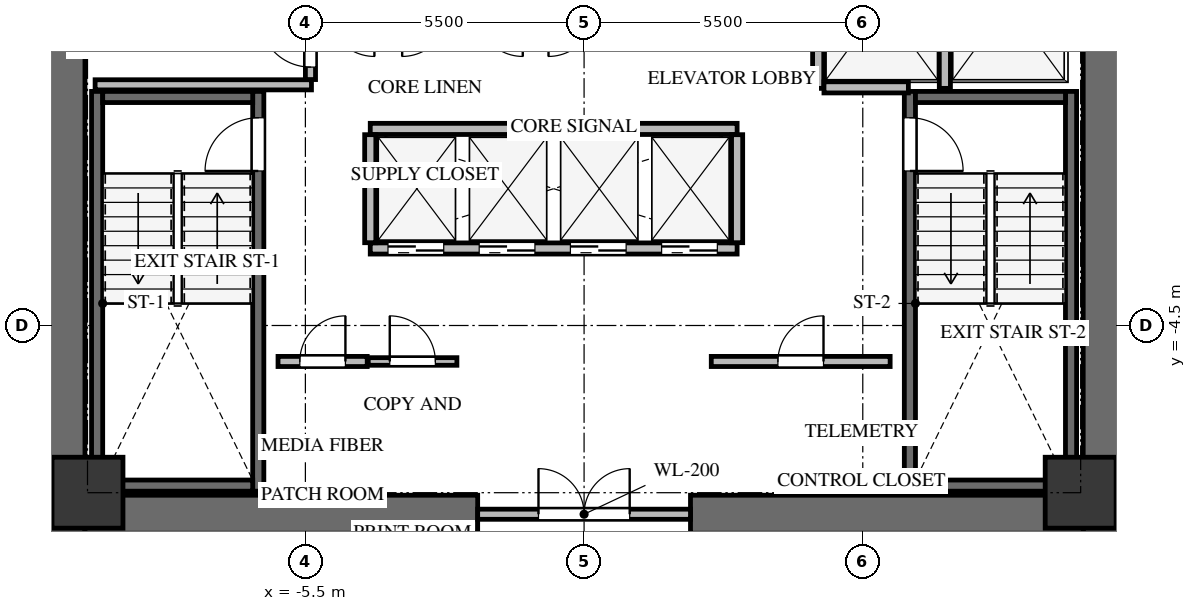
"""IFC4 building model, lengths in metres.
Left out: names, types, materials, properties, quantities, classifications, styles, units other than length and angle.
Written with IfcOpenShell. Run it as: python <this file> out.ifc"""

import sys

from ifc_helpers import new_model, si_unit, direction, frame, frame_2d, origin, origin_2d, place, context, subcontext, project, spatial, rectangle, extrude, source, transform, mapped, element, fill, save


model = new_model("IFC4")
c1 = context("Model", 3, precision=1e-05, world=origin(), true_north=direction((0.0, 1.0)))
c2 = subcontext(c1, "Body", "Model", "MODEL_VIEW")
j1 = project(units=[si_unit("LENGTHUNIT", "METRE"), si_unit("PLANEANGLEUNIT", "RADIAN")], contexts=[c1])
p1 = place(None, origin())
s1 = spatial("IfcSite", under=j1, at=p1, CompositionType="ELEMENT")
p2 = place(p1, origin())
s2 = spatial("IfcBuilding", under=s1, at=p2, CompositionType="ELEMENT")
p3 = place(p2, frame((0.0, 0.0, 123.9)))
s3 = spatial("IfcBuildingStorey", under=s2, at=p3, CompositionType="ELEMENT", Elevation=123.9)
for number, where, z_axis, x_axis in (
    (1, (-10.225, -8.6, 0.0), (0.0, 0.0, 1.0), (0.0, 1.0, 0.0)),
    (2, (10.225, -8.6, 0.0), (0.0, 0.0, 1.0), (0.0, 1.0, 0.0)),
):
    element("IfcWall", number, at=place(p3, frame(where, z_axis=z_axis, x_axis=x_axis)), inside=s3, PredefinedType="SHEAR", context=c2, shape_type="SweptSolid", body=[
        extrude(rectangle(XDim=17.2, YDim=0.75, at=frame_2d((8.6, 0.0))), origin(), (0.0, 0.0, 1.0), 3.3),
    ])
for number, where, z_axis, x_axis in (
    (3, (-9.85, -8.225, 0.0), (0.0, 0.0, 1.0), (1.0, 0.0, 0.0)),
    (4, (2.1, -8.225, 0.0), (0.0, 0.0, 1.0), (1.0, 0.0, 0.0)),
):
    element("IfcWall", number, at=place(p3, frame(where, z_axis=z_axis, x_axis=x_axis)), inside=s3, PredefinedType="SHEAR", context=c2, shape_type="SweptSolid", body=[
        extrude(rectangle(XDim=7.75, YDim=0.75, at=frame_2d((3.875, 0.0))), origin(), (0.0, 0.0, 1.0), 3.3),
    ])
p4 = place(p3, frame((-6.43, -7.77, -0.24), z_axis=(0.0, 0.0, 1.0), x_axis=(0.0, 1.0, 0.0)))
e5 = element("IfcWall", 5, at=p4, inside=s3, PredefinedType="SHEAR", context=c2, shape_type="SweptSolid", body=[
    extrude(rectangle(XDim=7.89, YDim=0.22, at=frame_2d((3.945, 0.0))), origin(), (0.0, 0.0, 1.0), 3.3),
])
p5 = place(p4, frame((6.32, 0.0, 0.0)))
e6 = element("IfcOpeningElement", 6, at=p5, cuts=e5, PredefinedType="OPENING", context=c2, shape_type="SweptSolid", body=[
    extrude(rectangle(XDim=1.05, YDim=2.15, at=frame_2d((0.525, 1.075))), frame((0.0, 0.12, 0.0), z_axis=(0.0, -1.0, 0.0), x_axis=(1.0, 0.0, 0.0)), (0.0, 0.0, 1.0), 0.24),
])
p6 = place(p3, frame((-9.61, 0.12, -0.24), z_axis=(0.0, 0.0, 1.0), x_axis=(0.0, -1.0, 0.0)))
e7 = element("IfcWall", 7, at=p6, inside=s3, PredefinedType="SHEAR", context=c2, shape_type="SweptSolid", body=[
    extrude(rectangle(XDim=7.89, YDim=0.22, at=frame_2d((3.945, 0.0))), origin(), (0.0, 0.0, 1.0), 3.3),
])
for number, where, z_axis, x_axis in (
    (8, (-9.5, -7.66, -0.24), (0.0, 0.0, 1.0), (1.0, 0.0, 0.0)),
    (9, (-6.54, 0.01, -0.24), (0.0, 0.0, 1.0), (-1.0, 0.0, 0.0)),
):
    element("IfcWall", number, at=place(p3, frame(where, z_axis=z_axis, x_axis=x_axis)), inside=s3, PredefinedType="SHEAR", context=c2, shape_type="SweptSolid", body=[
        extrude(rectangle(XDim=2.96, YDim=0.22, at=frame_2d((1.48, 0.0))), origin(), (0.0, 0.0, 1.0), 3.3),
    ])
p7 = place(p3, frame((9.61, -7.77, -0.24), z_axis=(0.0, 0.0, 1.0), x_axis=(0.0, 1.0, 0.0)))
e10 = element("IfcWall", 10, at=p7, inside=s3, PredefinedType="SHEAR", context=c2, shape_type="SweptSolid", body=[
    extrude(rectangle(XDim=7.89, YDim=0.22, at=frame_2d((3.945, 0.0))), origin(), (0.0, 0.0, 1.0), 3.3),
])
p8 = place(p3, frame((6.43, 0.12, -0.24), z_axis=(0.0, 0.0, 1.0), x_axis=(0.0, -1.0, 0.0)))
e11 = element("IfcWall", 11, at=p8, inside=s3, PredefinedType="SHEAR", context=c2, shape_type="SweptSolid", body=[
    extrude(rectangle(XDim=7.89, YDim=0.22, at=frame_2d((3.945, 0.0))), origin(), (0.0, 0.0, 1.0), 3.3),
])
p9 = place(p8, frame((0.52, 0.0, 0.0)))
e12 = element("IfcOpeningElement", 12, at=p9, cuts=e11, PredefinedType="OPENING", context=c2, shape_type="SweptSolid", body=[
    extrude(rectangle(XDim=1.05, YDim=2.15, at=frame_2d((0.525, 1.075))), frame((0.0, 0.12, 0.0), z_axis=(0.0, -1.0, 0.0), x_axis=(1.0, 0.0, 0.0)), (0.0, 0.0, 1.0), 0.24),
])
for number, where, z_axis, x_axis in (
    (13, (6.54, -7.66, -0.24), (0.0, 0.0, 1.0), (1.0, 0.0, 0.0)),
    (14, (9.5, 0.01, -0.24), (0.0, 0.0, 1.0), (-1.0, 0.0, 0.0)),
):
    element("IfcWall", number, at=place(p3, frame(where, z_axis=z_axis, x_axis=x_axis)), inside=s3, PredefinedType="SHEAR", context=c2, shape_type="SweptSolid", body=[
        extrude(rectangle(XDim=2.96, YDim=0.22, at=frame_2d((1.48, 0.0))), origin(), (0.0, 0.0, 1.0), 3.3),
    ])
m1 = source(origin(), c2, "Body", "SweptSolid", [
    extrude(rectangle(XDim=1.4, YDim=1.4, at=origin_2d()), origin(), (0.0, 0.0, 1.0), 3.3),
])
for number, where, z_axis, x_axis in (
    (15, (-9.8, -7.8, -0.24), (0.0, 0.0, 1.0), (1.0, 0.0, 0.0)),
    (16, (9.8, -7.8, -0.24), (0.0, 0.0, 1.0), (1.0, 0.0, 0.0)),
):
    element("IfcColumn", number, at=place(p3, frame(where, z_axis=z_axis, x_axis=x_axis)), inside=s3, PredefinedType="COLUMN", context=c2, shape_type="MappedRepresentation", body=[
        mapped(m1, transform((0.0, 0.0, 0.0), x_axis=(1.0, 0.0, 0.0), y_axis=(0.0, 1.0, 0.0), z_axis=(0.0, 0.0, 1.0), scale=1.0)),
    ])
p10 = place(p3, frame((-2.1, -8.225, 0.0), z_axis=(0.0, 0.0, 1.0), x_axis=(1.0, 0.0, 0.0)))
e17 = element("IfcWall", 17, at=p10, inside=s3, PredefinedType="SOLIDWALL", context=c2, shape_type="SweptSolid", body=[
    extrude(rectangle(XDim=4.2, YDim=0.2, at=frame_2d((2.1, 0.0))), origin(), (0.0, 0.0, 1.0), 3.045),
])
p11 = place(p10, frame((1.2, 0.0, 0.0)))
e18 = element("IfcOpeningElement", 18, at=p11, cuts=e17, PredefinedType="OPENING", context=c2, shape_type="SweptSolid", body=[
    extrude(rectangle(XDim=1.8, YDim=2.15, at=frame_2d((0.9, 1.075))), frame((0.0, 0.11, 0.0), z_axis=(0.0, -1.0, 0.0), x_axis=(1.0, 0.0, 0.0)), (0.0, 0.0, 1.0), 0.22),
])
p12 = place(p3, frame((-9.65, 0.25, 0.0), z_axis=(0.0, 0.0, 1.0), x_axis=(1.0, 0.0, 0.0)))
e19 = element("IfcWall", 19, at=p12, inside=s3, PredefinedType="SOLIDWALL", context=c2, shape_type="SweptSolid", body=[
    extrude(rectangle(XDim=4.27, YDim=0.2, at=frame_2d((2.135, 0.0))), origin(), (0.0, 0.0, 1.0), 3.045),
])
p13 = place(p3, frame((-5.4, 0.354, 0.0), z_axis=(0.0, 0.0, 1.0), x_axis=(0.0, 1.0, 0.0)))
e20 = element("IfcWall", 20, at=p13, inside=s3, PredefinedType="SOLIDWALL", context=c2, shape_type="SweptSolid", body=[
    extrude(rectangle(XDim=4.026, YDim=0.2, at=frame_2d((2.013, 0.0))), origin(), (0.0, 0.0, 1.0), 3.045),
])
p14 = place(p13, frame((0.246, 0.0, 0.0)))
e21 = element("IfcOpeningElement", 21, at=p14, cuts=e20, PredefinedType="OPENING", context=c2, shape_type="SweptSolid", body=[
    extrude(rectangle(XDim=1.0, YDim=2.15, at=frame_2d((0.5, 1.075))), frame((0.0, 0.11, 0.0), z_axis=(0.0, -1.0, 0.0), x_axis=(1.0, 0.0, 0.0)), (0.0, 0.0, 1.0), 0.22),
])
for number, where, z_axis, x_axis in (
    (22, (4.62, 0.18, 0.0), (0.0, 0.0, 1.0), (0.0, 1.0, 0.0)),
    (23, (7.12, 0.18, 0.0), (0.0, 0.0, 1.0), (0.0, 1.0, 0.0)),
):
    element("IfcWall", number, at=place(p3, frame(where, z_axis=z_axis, x_axis=x_axis)), inside=s3, PredefinedType="SOLIDWALL", context=c2, shape_type="SweptSolid", body=[
        extrude(rectangle(XDim=3.186, YDim=0.22, at=frame_2d((1.593, 0.0))), origin(), (0.0, 0.0, 1.0), 3.045),
    ])
p15 = place(p3, frame((4.734, 0.2, 0.0), z_axis=(0.0, 0.0, 1.0), x_axis=(1.0, 0.0, 0.0)))
e24 = element("IfcWall", 24, at=p15, inside=s3, PredefinedType="SOLIDWALL", context=c2, shape_type="SweptSolid", body=[
    extrude(rectangle(XDim=1.666, YDim=0.22, at=frame_2d((0.833, 0.0))), origin(), (0.0, 0.0, 1.0), 3.045),
])
p16 = place(p3, frame((-4.22, -2.98, 0.0), z_axis=(0.0, 0.0, 1.0), x_axis=(1.0, 0.0, 0.0)))
e25 = element("IfcWall", 25, at=p16, inside=s3, PredefinedType="SOLIDWALL", context=c2, shape_type="SweptSolid", body=[
    extrude(rectangle(XDim=7.24, YDim=0.22, at=frame_2d((3.62, 0.0))), origin(), (0.0, 0.0, 1.0), 3.045),
])
p17 = place(p16, frame((0.35, 0.0, 0.0)))
e26 = element("IfcOpeningElement", 26, at=p17, cuts=e25, PredefinedType="OPENING", context=c2, shape_type="SweptSolid", body=[
    extrude(rectangle(XDim=1.1, YDim=2.15, at=frame_2d((0.55, 1.075))), frame((0.0, 0.12, 0.0), z_axis=(0.0, -1.0, 0.0), x_axis=(1.0, 0.0, 0.0)), (0.0, 0.0, 1.0), 0.24),
])
p18 = place(p16, frame((2.15, 0.0, 0.0)))
e27 = element("IfcOpeningElement", 27, at=p18, cuts=e25, PredefinedType="OPENING", context=c2, shape_type="SweptSolid", body=[
    extrude(rectangle(XDim=1.1, YDim=2.15, at=frame_2d((0.55, 1.075))), frame((0.0, 0.12, 0.0), z_axis=(0.0, -1.0, 0.0), x_axis=(1.0, 0.0, 0.0)), (0.0, 0.0, 1.0), 0.24),
])
p19 = place(p16, frame((3.95, 0.0, 0.0)))
e28 = element("IfcOpeningElement", 28, at=p19, cuts=e25, PredefinedType="OPENING", context=c2, shape_type="SweptSolid", body=[
    extrude(rectangle(XDim=1.1, YDim=2.15, at=frame_2d((0.55, 1.075))), frame((0.0, 0.12, 0.0), z_axis=(0.0, -1.0, 0.0), x_axis=(1.0, 0.0, 0.0)), (0.0, 0.0, 1.0), 0.24),
])
p20 = place(p16, frame((5.75, 0.0, 0.0)))
e29 = element("IfcOpeningElement", 29, at=p20, cuts=e25, PredefinedType="OPENING", context=c2, shape_type="SweptSolid", body=[
    extrude(rectangle(XDim=1.1, YDim=2.15, at=frame_2d((0.55, 1.075))), frame((0.0, 0.12, 0.0), z_axis=(0.0, -1.0, 0.0), x_axis=(1.0, 0.0, 0.0)), (0.0, 0.0, 1.0), 0.24),
])
p21 = place(p3, frame((-4.22, -0.62, 0.0), z_axis=(0.0, 0.0, 1.0), x_axis=(1.0, 0.0, 0.0)))
e30 = element("IfcWall", 30, at=p21, inside=s3, PredefinedType="SOLIDWALL", context=c2, shape_type="SweptSolid", body=[
    extrude(rectangle(XDim=7.24, YDim=0.22, at=frame_2d((3.62, 0.0))), origin(), (0.0, 0.0, 1.0), 3.045),
])
for number, where, z_axis, x_axis in (
    (31, (-4.22, -2.866, 0.0), (0.0, 0.0, 1.0), (0.0, 1.0, 0.0)),
    (32, (3.02, -2.866, 0.0), (0.0, 0.0, 1.0), (0.0, 1.0, 0.0)),
):
    element("IfcWall", number, at=place(p3, frame(where, z_axis=z_axis, x_axis=x_axis)), inside=s3, PredefinedType="SOLIDWALL", context=c2, shape_type="SweptSolid", body=[
        extrude(rectangle(XDim=2.132, YDim=0.22, at=frame_2d((1.066, 0.0))), origin(), (0.0, 0.0, 1.0), 3.045),
    ])
p22 = place(p3, frame((-6.04, -5.21, 0.0), z_axis=(0.0, 0.0, 1.0), x_axis=(1.0, 0.0, 0.0)))
e33 = element("IfcWall", 33, at=p22, inside=s3, PredefinedType="SOLIDWALL", context=c2, shape_type="SweptSolid", body=[
    extrude(rectangle(XDim=1.76, YDim=0.2, at=frame_2d((0.88, 0.0))), origin(), (0.0, 0.0, 1.0), 3.045),
])
p23 = place(p22, frame((0.43, 0.0, 0.0)))
e34 = element("IfcOpeningElement", 34, at=p23, cuts=e33, PredefinedType="OPENING", context=c2, shape_type="SweptSolid", body=[
    extrude(rectangle(XDim=0.9, YDim=2.05, at=frame_2d((0.45, 1.025))), frame((0.0, 0.11, 0.0), z_axis=(0.0, -1.0, 0.0), x_axis=(1.0, 0.0, 0.0)), (0.0, 0.0, 1.0), 0.22),
])
p24 = place(p3, frame((-4.26, -5.21, 0.0), z_axis=(0.0, 0.0, 1.0), x_axis=(1.0, 0.0, 0.0)))
e35 = element("IfcWall", 35, at=p24, inside=s3, PredefinedType="PARTITIONING", context=c2, shape_type="SweptSolid", body=[
    extrude(rectangle(XDim=1.75, YDim=0.15, at=frame_2d((0.875, 0.0))), origin(), (0.0, 0.0, 1.0), 3.045),
])
p25 = place(p24, frame((0.425, 0.0, 0.0)))
e36 = element("IfcOpeningElement", 36, at=p25, cuts=e35, PredefinedType="OPENING", context=c2, shape_type="SweptSolid", body=[
    extrude(rectangle(XDim=0.9, YDim=2.05, at=frame_2d((0.45, 1.025))), frame((0.0, 0.085, 0.0), z_axis=(0.0, -1.0, 0.0), x_axis=(1.0, 0.0, 0.0)), (0.0, 0.0, 1.0), 0.17),
])
p26 = place(p3, frame((2.51, -5.21, 0.0), z_axis=(0.0, 0.0, 1.0), x_axis=(1.0, 0.0, 0.0)))
e37 = element("IfcWall", 37, at=p26, inside=s3, PredefinedType="SOLIDWALL", context=c2, shape_type="SweptSolid", body=[
    extrude(rectangle(XDim=3.53, YDim=0.2, at=frame_2d((1.765, 0.0))), origin(), (0.0, 0.0, 1.0), 3.045),
])
p27 = place(p26, frame((1.315, 0.0, 0.0)))
e38 = element("IfcOpeningElement", 38, at=p27, cuts=e37, PredefinedType="OPENING", context=c2, shape_type="SweptSolid", body=[
    extrude(rectangle(XDim=0.9, YDim=2.05, at=frame_2d((0.45, 1.025))), frame((0.0, 0.11, 0.0), z_axis=(0.0, -1.0, 0.0), x_axis=(1.0, 0.0, 0.0)), (0.0, 0.0, 1.0), 0.22),
])
m2 = source(origin(), c2, "Body", "SweptSolid", [
    extrude(rectangle(XDim=1.05, YDim=2.15, at=frame_2d((0.525, 1.075))), frame((0.0, 0.025, 0.0), z_axis=(0.0, -1.0, 0.0), x_axis=(1.0, 0.0, 0.0)), (0.0, 0.0, 1.0), 0.05),
])
p28 = place(p5, origin())
e39 = element("IfcDoor", 39, at=p28, inside=s3, OperationType="SINGLE_SWING_LEFT", PredefinedType="DOOR", context=c2, shape_type="MappedRepresentation", body=[
    mapped(m2, transform((0.0, 0.0, 0.0), x_axis=(1.0, 0.0, 0.0), y_axis=(0.0, 1.0, 0.0), z_axis=(0.0, 0.0, 1.0), scale=1.0)),
])
fill(e6, e39)
m3 = source(origin(), c2, "Body", "SweptSolid", [
    extrude(rectangle(XDim=1.05, YDim=2.15, at=frame_2d((0.525, 1.075))), frame((0.0, 0.025, 0.0), z_axis=(0.0, -1.0, 0.0), x_axis=(1.0, 0.0, 0.0)), (0.0, 0.0, 1.0), 0.05),
])
p29 = place(p9, origin())
e40 = element("IfcDoor", 40, at=p29, inside=s3, OperationType="SINGLE_SWING_RIGHT", PredefinedType="DOOR", context=c2, shape_type="MappedRepresentation", body=[
    mapped(m3, transform((0.0, 0.0, 0.0), x_axis=(1.0, 0.0, 0.0), y_axis=(0.0, 1.0, 0.0), z_axis=(0.0, 0.0, 1.0), scale=1.0)),
])
fill(e12, e40)
m4 = source(origin(), c2, "Body", "SweptSolid", [
    extrude(rectangle(XDim=1.8, YDim=2.15, at=frame_2d((0.9, 1.075))), frame((0.0, 0.025, 0.0), z_axis=(0.0, -1.0, 0.0), x_axis=(1.0, 0.0, 0.0)), (0.0, 0.0, 1.0), 0.05),
])
p30 = place(p11, origin())
e41 = element("IfcDoor", 41, at=p30, inside=s3, OperationType="DOUBLE_DOOR_SINGLE_SWING", PredefinedType="DOOR", context=c2, shape_type="MappedRepresentation", body=[
    mapped(m4, transform((0.0, 0.0, 0.0), x_axis=(1.0, 0.0, 0.0), y_axis=(0.0, 1.0, 0.0), z_axis=(0.0, 0.0, 1.0), scale=1.0)),
])
fill(e18, e41)
m5 = source(origin(), c2, "Body", "SweptSolid", [
    extrude(rectangle(XDim=1.0, YDim=2.15, at=frame_2d((0.5, 1.075))), frame((0.0, 0.025, 0.0), z_axis=(0.0, -1.0, 0.0), x_axis=(1.0, 0.0, 0.0)), (0.0, 0.0, 1.0), 0.05),
])
p31 = place(p14, origin())
e42 = element("IfcDoor", 42, at=p31, inside=s3, OperationType="SINGLE_SWING_RIGHT", PredefinedType="DOOR", context=c2, shape_type="MappedRepresentation", body=[
    mapped(m5, transform((0.0, 0.0, 0.0), x_axis=(1.0, 0.0, 0.0), y_axis=(0.0, 1.0, 0.0), z_axis=(0.0, 0.0, 1.0), scale=1.0)),
])
fill(e21, e42)
m6 = source(origin(), c2, "Body", "SweptSolid", [
    extrude(rectangle(XDim=1.1, YDim=2.15, at=frame_2d((0.55, 1.075))), frame((0.0, 0.025, 0.0), z_axis=(0.0, -1.0, 0.0), x_axis=(1.0, 0.0, 0.0)), (0.0, 0.0, 1.0), 0.05),
])
p32 = place(p17, origin())
e43 = element("IfcDoor", 43, at=p32, inside=s3, OperationType="DOUBLE_DOOR_SLIDING", PredefinedType="DOOR", context=c2, shape_type="MappedRepresentation", body=[
    mapped(m6, transform((0.0, 0.0, 0.0), x_axis=(1.0, 0.0, 0.0), y_axis=(0.0, 1.0, 0.0), z_axis=(0.0, 0.0, 1.0), scale=1.0)),
])
fill(e26, e43)
p33 = place(p18, origin())
e44 = element("IfcDoor", 44, at=p33, inside=s3, OperationType="DOUBLE_DOOR_SLIDING", PredefinedType="DOOR", context=c2, shape_type="MappedRepresentation", body=[
    mapped(m6, transform((0.0, 0.0, 0.0), x_axis=(1.0, 0.0, 0.0), y_axis=(0.0, 1.0, 0.0), z_axis=(0.0, 0.0, 1.0), scale=1.0)),
])
fill(e27, e44)
p34 = place(p19, origin())
e45 = element("IfcDoor", 45, at=p34, inside=s3, OperationType="DOUBLE_DOOR_SLIDING", PredefinedType="DOOR", context=c2, shape_type="MappedRepresentation", body=[
    mapped(m6, transform((0.0, 0.0, 0.0), x_axis=(1.0, 0.0, 0.0), y_axis=(0.0, 1.0, 0.0), z_axis=(0.0, 0.0, 1.0), scale=1.0)),
])
fill(e28, e45)
p35 = place(p20, origin())
e46 = element("IfcDoor", 46, at=p35, inside=s3, OperationType="DOUBLE_DOOR_SLIDING", PredefinedType="DOOR", context=c2, shape_type="MappedRepresentation", body=[
    mapped(m6, transform((0.0, 0.0, 0.0), x_axis=(1.0, 0.0, 0.0), y_axis=(0.0, 1.0, 0.0), z_axis=(0.0, 0.0, 1.0), scale=1.0)),
])
fill(e29, e46)
m7 = source(origin(), c2, "Body", "SweptSolid", [
    extrude(rectangle(XDim=0.9, YDim=2.05, at=frame_2d((0.45, 1.025))), frame((0.0, 0.025, 0.0), z_axis=(0.0, -1.0, 0.0), x_axis=(1.0, 0.0, 0.0)), (0.0, 0.0, 1.0), 0.05),
])
p36 = place(p23, origin())
e47 = element("IfcDoor", 47, at=p36, inside=s3, OperationType="SINGLE_SWING_RIGHT", PredefinedType="DOOR", context=c2, shape_type="MappedRepresentation", body=[
    mapped(m7, transform((0.0, 0.0, 0.0), x_axis=(1.0, 0.0, 0.0), y_axis=(0.0, 1.0, 0.0), z_axis=(0.0, 0.0, 1.0), scale=1.0)),
])
fill(e34, e47)
m8 = source(origin(), c2, "Body", "SweptSolid", [
    extrude(rectangle(XDim=0.9, YDim=2.05, at=frame_2d((0.45, 1.025))), frame((0.0, 0.025, 0.0), z_axis=(0.0, -1.0, 0.0), x_axis=(1.0, 0.0, 0.0)), (0.0, 0.0, 1.0), 0.05),
])
p37 = place(p25, origin())
e48 = element("IfcDoor", 48, at=p37, inside=s3, OperationType="SINGLE_SWING_LEFT", PredefinedType="DOOR", context=c2, shape_type="MappedRepresentation", body=[
    mapped(m8, transform((0.0, 0.0, 0.0), x_axis=(1.0, 0.0, 0.0), y_axis=(0.0, 1.0, 0.0), z_axis=(0.0, 0.0, 1.0), scale=1.0)),
])
fill(e36, e48)
p38 = place(p27, origin())
e49 = element("IfcDoor", 49, at=p38, inside=s3, OperationType="SINGLE_SWING_RIGHT", PredefinedType="DOOR", context=c2, shape_type="MappedRepresentation", body=[
    mapped(m7, transform((0.0, 0.0, 0.0), x_axis=(1.0, 0.0, 0.0), y_axis=(0.0, 1.0, 0.0), z_axis=(0.0, 0.0, 1.0), scale=1.0)),
])
fill(e38, e49)
save(model, sys.argv[1])
